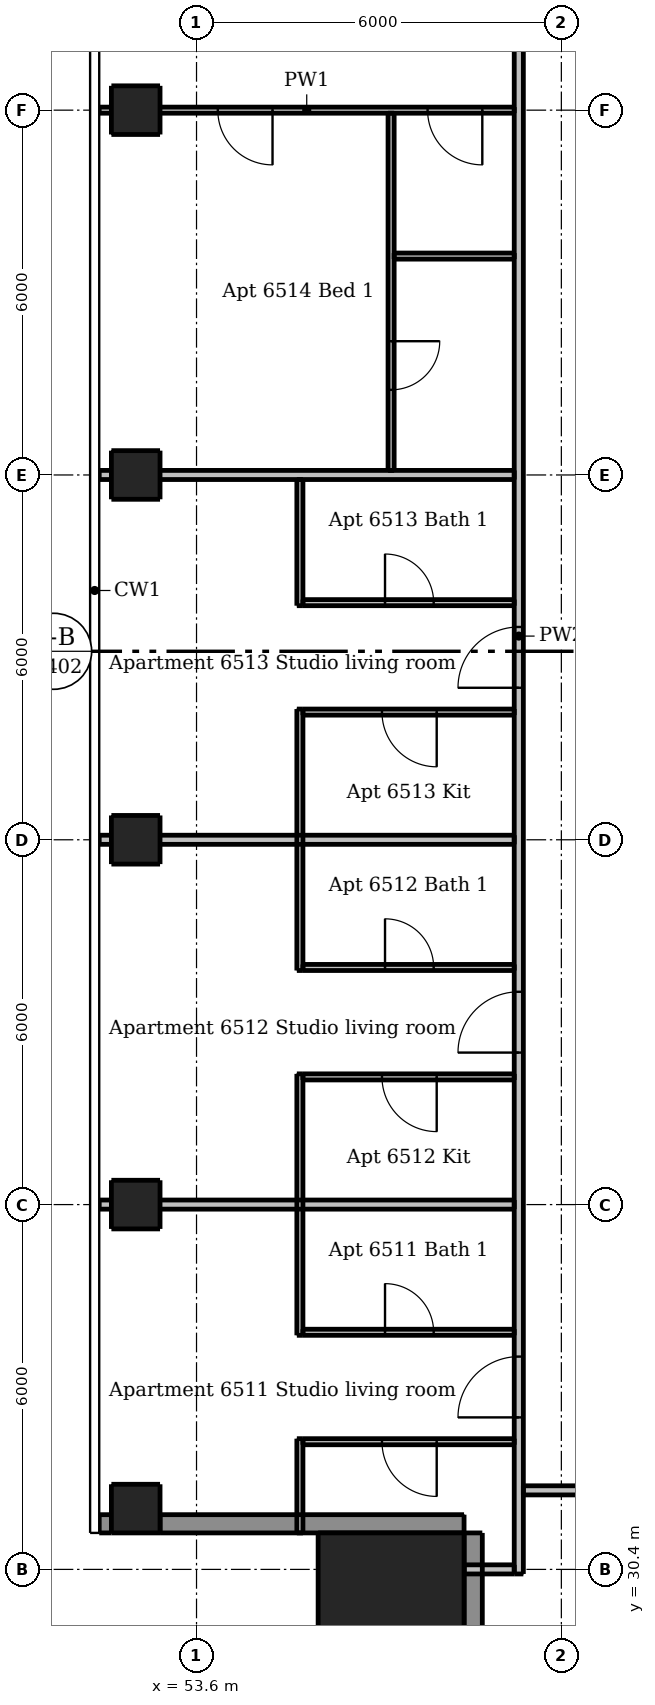
"""IFC4 building model, lengths in metres.
Left out: names, types, materials, properties, quantities, classifications, styles, units other than length and angle.
Written with IfcOpenShell. Run it as: python <this file> out.ifc"""

import sys

from ifc_helpers import new_model, si_unit, direction, frame, frame_2d, origin, origin_2d, place, context, subcontext, project, spatial, rectangle, extrude, element, fill, save


model = new_model("IFC4")
c1 = context("Model", 3, precision=1e-05, world=origin(), true_north=direction((0.0, 1.0)))
c2 = subcontext(c1, "Body", "Model", "MODEL_VIEW")
j1 = project(units=[si_unit("LENGTHUNIT", "METRE"), si_unit("PLANEANGLEUNIT", "RADIAN")], contexts=[c1])
p1 = place(None, origin())
s1 = spatial("IfcSite", under=j1, at=p1, CompositionType="ELEMENT")
p2 = place(p1, origin())
s2 = spatial("IfcBuilding", under=s1, at=p2, CompositionType="ELEMENT")
p3 = place(p2, frame((0.0, 0.0, 245.5)))
s3 = spatial("IfcBuildingStorey", under=s2, at=p3, CompositionType="ELEMENT", Elevation=245.5)
for number, where, z_axis, x_axis in (
    (1, (52.6, 31.4, 0.0), (0.0, 0.0, 1.0), (1.0, 0.0, 0.0)),
    (2, (52.6, 36.4, 0.0), (0.0, 0.0, 1.0), (1.0, 0.0, 0.0)),
    (3, (52.6, 42.4, 0.0), (0.0, 0.0, 1.0), (1.0, 0.0, 0.0)),
    (4, (52.6, 48.4, 0.0), (0.0, 0.0, 1.0), (1.0, 0.0, 0.0)),
    (5, (52.6, 54.4, 0.0), (0.0, 0.0, 1.0), (1.0, 0.0, 0.0)),
):
    element("IfcColumn", number, at=place(p3, frame(where, z_axis=z_axis, x_axis=x_axis)), inside=s3, PredefinedType="COLUMN", context=c2, shape_type="SweptSolid", body=[
        extrude(rectangle(XDim=0.8, YDim=0.8, at=origin_2d()), origin(), (0.0, 0.0, 1.0), 3.05),
    ])
p4 = place(p3, frame((56.8, 29.8, 0.0), z_axis=(0.0, 0.0, 1.0), x_axis=(1.0, 0.0, 0.0)))
e6 = element("IfcColumn", 6, at=p4, inside=s3, PredefinedType="COLUMN", context=c2, shape_type="SweptSolid", body=[
    extrude(rectangle(XDim=2.4, YDim=2.4, at=origin_2d()), origin(), (0.0, 0.0, 1.0), 3.3),
])
p5 = place(p3, frame((52.0, 31.15, 0.0), z_axis=(0.0, 0.0, 1.0), x_axis=(1.0, 0.0, 0.0)))
e7 = element("IfcWall", 7, at=p5, inside=s3, PredefinedType="SOLIDWALL", context=c2, shape_type="SweptSolid", body=[
    extrude(rectangle(XDim=0.2, YDim=0.3, at=frame_2d((0.1, 0.0))), origin(), (0.0, 0.0, 1.0), 3.05),
])
p6 = place(p3, frame((53.0, 31.15, 0.0), z_axis=(0.0, 0.0, 1.0), x_axis=(1.0, 0.0, 0.0)))
e8 = element("IfcWall", 8, at=p6, inside=s3, PredefinedType="SOLIDWALL", context=c2, shape_type="SweptSolid", body=[
    extrude(rectangle(XDim=5.0, YDim=0.3, at=frame_2d((2.5, 0.0))), origin(), (0.0, 0.0, 1.0), 3.05),
])
p7 = place(p3, frame((58.15, 31.0, 0.0), z_axis=(0.0, 0.0, 1.0), x_axis=(0.0, -1.0, 0.0)))
e9 = element("IfcWall", 9, at=p7, inside=s3, PredefinedType="SOLIDWALL", context=c2, shape_type="SweptSolid", body=[
    extrude(rectangle(XDim=6.0, YDim=0.3, at=frame_2d((3.0, 0.0))), origin(), (0.0, 0.0, 1.0), 3.05),
])
p8 = place(p7, frame((1.8, 0.0, 0.15)))
e10 = element("IfcOpeningElement", 10, at=p8, cuts=e9, PredefinedType="OPENING", context=c2, shape_type="SweptSolid", body=[
    extrude(rectangle(XDim=2.4, YDim=2.1, at=frame_2d((1.2, 1.05))), frame((0.0, 0.16, 0.0), z_axis=(0.0, -1.0, 0.0), x_axis=(1.0, 0.0, 0.0)), (0.0, 0.0, 1.0), 0.32),
])
p9 = place(p3, frame((55.3, 31.0, 0.0), z_axis=(0.0, 0.0, 1.0), x_axis=(0.0, 1.0, 0.0)))
e11 = element("IfcWall", 11, at=p9, inside=s3, PredefinedType="PARTITIONING", context=c2, shape_type="SweptSolid", body=[
    extrude(rectangle(XDim=1.55, YDim=0.1, at=frame_2d((0.775, 0.0))), origin(), (0.0, 0.0, 1.0), 3.05),
])
for number, where, z_axis, x_axis in (
    (12, (55.3, 34.25, 0.0), (0.0, 0.0, 1.0), (0.0, 1.0, 0.0)),
    (13, (55.3, 40.25, 0.0), (0.0, 0.0, 1.0), (0.0, 1.0, 0.0)),
):
    element("IfcWall", number, at=place(p3, frame(where, z_axis=z_axis, x_axis=x_axis)), inside=s3, PredefinedType="PARTITIONING", context=c2, shape_type="SweptSolid", body=[
        extrude(rectangle(XDim=4.3, YDim=0.1, at=frame_2d((2.15, 0.0))), origin(), (0.0, 0.0, 1.0), 3.05),
    ])
p10 = place(p3, frame((55.3, 46.25, 0.0), z_axis=(0.0, 0.0, 1.0), x_axis=(0.0, 1.0, 0.0)))
e14 = element("IfcWall", 14, at=p10, inside=s3, PredefinedType="PARTITIONING", context=c2, shape_type="SweptSolid", body=[
    extrude(rectangle(XDim=2.075, YDim=0.1, at=frame_2d((1.038, 0.0))), origin(), (0.0, 0.0, 1.0), 3.05),
])
p11 = place(p3, frame((56.8, 54.35, 0.0), z_axis=(0.0, 0.0, 1.0), x_axis=(0.0, -1.0, 0.0)))
e15 = element("IfcWall", 15, at=p11, inside=s3, PredefinedType="PARTITIONING", context=c2, shape_type="SweptSolid", body=[
    extrude(rectangle(XDim=5.875, YDim=0.1, at=frame_2d((2.938, 0.0))), origin(), (0.0, 0.0, 1.0), 3.05),
])
p12 = place(p11, frame((3.75, 0.0, 0.0)))
e16 = element("IfcOpeningElement", 16, at=p12, cuts=e15, PredefinedType="OPENING", context=c2, shape_type="SweptSolid", body=[
    extrude(rectangle(XDim=0.8, YDim=2.1, at=frame_2d((0.4, 1.05))), frame((0.0, 0.06, 0.0), z_axis=(0.0, -1.0, 0.0), x_axis=(1.0, 0.0, 0.0)), (0.0, 0.0, 1.0), 0.12),
])
p13 = place(p3, frame((58.825, 54.4, 0.0), z_axis=(0.0, 0.0, 1.0), x_axis=(-1.0, 0.0, 0.0)))
e17 = element("IfcWall", 17, at=p13, inside=s3, PredefinedType="PARTITIONING", context=c2, shape_type="SweptSolid", body=[
    extrude(rectangle(XDim=6.825, YDim=0.1, at=frame_2d((3.413, 0.0))), origin(), (0.0, 0.0, 1.0), 2.516),
])
p14 = place(p13, frame((0.525, 0.0, 0.0)))
e18 = element("IfcOpeningElement", 18, at=p14, cuts=e17, PredefinedType="OPENING", context=c2, shape_type="SweptSolid", body=[
    extrude(rectangle(XDim=0.9, YDim=2.1, at=frame_2d((0.45, 1.05))), frame((0.0, 0.06, 0.0), z_axis=(0.0, -1.0, 0.0), x_axis=(1.0, 0.0, 0.0)), (0.0, 0.0, 1.0), 0.12),
])
p15 = place(p13, frame((3.975, 0.0, 0.0)))
e19 = element("IfcOpeningElement", 19, at=p15, cuts=e17, PredefinedType="OPENING", context=c2, shape_type="SweptSolid", body=[
    extrude(rectangle(XDim=0.9, YDim=2.1, at=frame_2d((0.45, 1.05))), frame((0.0, 0.06, 0.0), z_axis=(0.0, -1.0, 0.0), x_axis=(1.0, 0.0, 0.0)), (0.0, 0.0, 1.0), 0.12),
])
p16 = place(p3, frame((56.85, 52.0, 0.0), z_axis=(0.0, 0.0, 1.0), x_axis=(1.0, 0.0, 0.0)))
e20 = element("IfcWall", 20, at=p16, inside=s3, PredefinedType="PARTITIONING", context=c2, shape_type="SweptSolid", body=[
    extrude(rectangle(XDim=1.975, YDim=0.1, at=frame_2d((0.987, 0.0))), origin(), (0.0, 0.0, 1.0), 3.05),
])
p17 = place(p3, frame((55.35, 46.3, 0.0), z_axis=(0.0, 0.0, 1.0), x_axis=(1.0, 0.0, 0.0)))
e21 = element("IfcWall", 21, at=p17, inside=s3, PredefinedType="PARTITIONING", context=c2, shape_type="SweptSolid", body=[
    extrude(rectangle(XDim=3.475, YDim=0.1, at=frame_2d((1.737, 0.0))), origin(), (0.0, 0.0, 1.0), 3.05),
])
p18 = place(p17, frame((1.35, 0.0, 0.0)))
e22 = element("IfcOpeningElement", 22, at=p18, cuts=e21, PredefinedType="OPENING", context=c2, shape_type="SweptSolid", body=[
    extrude(rectangle(XDim=0.8, YDim=2.1, at=frame_2d((0.4, 1.05))), frame((0.0, 0.06, 0.0), z_axis=(0.0, -1.0, 0.0), x_axis=(1.0, 0.0, 0.0)), (0.0, 0.0, 1.0), 0.12),
])
p19 = place(p3, frame((58.825, 44.5, 0.0), z_axis=(0.0, 0.0, 1.0), x_axis=(-1.0, 0.0, 0.0)))
e23 = element("IfcWall", 23, at=p19, inside=s3, PredefinedType="PARTITIONING", context=c2, shape_type="SweptSolid", body=[
    extrude(rectangle(XDim=3.475, YDim=0.1, at=frame_2d((1.737, 0.0))), origin(), (0.0, 0.0, 1.0), 3.05),
])
p20 = place(p19, frame((1.275, 0.0, 0.0)))
e24 = element("IfcOpeningElement", 24, at=p20, cuts=e23, PredefinedType="OPENING", context=c2, shape_type="SweptSolid", body=[
    extrude(rectangle(XDim=0.9, YDim=2.1, at=frame_2d((0.45, 1.05))), frame((0.0, 0.06, 0.0), z_axis=(0.0, -1.0, 0.0), x_axis=(1.0, 0.0, 0.0)), (0.0, 0.0, 1.0), 0.12),
])
p21 = place(p3, frame((55.35, 40.3, 0.0), z_axis=(0.0, 0.0, 1.0), x_axis=(1.0, 0.0, 0.0)))
e25 = element("IfcWall", 25, at=p21, inside=s3, PredefinedType="PARTITIONING", context=c2, shape_type="SweptSolid", body=[
    extrude(rectangle(XDim=3.475, YDim=0.1, at=frame_2d((1.737, 0.0))), origin(), (0.0, 0.0, 1.0), 3.05),
])
p22 = place(p21, frame((1.35, 0.0, 0.0)))
e26 = element("IfcOpeningElement", 26, at=p22, cuts=e25, PredefinedType="OPENING", context=c2, shape_type="SweptSolid", body=[
    extrude(rectangle(XDim=0.8, YDim=2.1, at=frame_2d((0.4, 1.05))), frame((0.0, 0.06, 0.0), z_axis=(0.0, -1.0, 0.0), x_axis=(1.0, 0.0, 0.0)), (0.0, 0.0, 1.0), 0.12),
])
p23 = place(p3, frame((58.825, 38.5, 0.0), z_axis=(0.0, 0.0, 1.0), x_axis=(-1.0, 0.0, 0.0)))
e27 = element("IfcWall", 27, at=p23, inside=s3, PredefinedType="PARTITIONING", context=c2, shape_type="SweptSolid", body=[
    extrude(rectangle(XDim=3.475, YDim=0.1, at=frame_2d((1.737, 0.0))), origin(), (0.0, 0.0, 1.0), 3.05),
])
p24 = place(p23, frame((1.275, 0.0, 0.0)))
e28 = element("IfcOpeningElement", 28, at=p24, cuts=e27, PredefinedType="OPENING", context=c2, shape_type="SweptSolid", body=[
    extrude(rectangle(XDim=0.9, YDim=2.1, at=frame_2d((0.45, 1.05))), frame((0.0, 0.06, 0.0), z_axis=(0.0, -1.0, 0.0), x_axis=(1.0, 0.0, 0.0)), (0.0, 0.0, 1.0), 0.12),
])
p25 = place(p3, frame((55.35, 34.3, 0.0), z_axis=(0.0, 0.0, 1.0), x_axis=(1.0, 0.0, 0.0)))
e29 = element("IfcWall", 29, at=p25, inside=s3, PredefinedType="PARTITIONING", context=c2, shape_type="SweptSolid", body=[
    extrude(rectangle(XDim=3.475, YDim=0.1, at=frame_2d((1.737, 0.0))), origin(), (0.0, 0.0, 1.0), 3.05),
])
p26 = place(p25, frame((1.35, 0.0, 0.0)))
e30 = element("IfcOpeningElement", 30, at=p26, cuts=e29, PredefinedType="OPENING", context=c2, shape_type="SweptSolid", body=[
    extrude(rectangle(XDim=0.8, YDim=2.1, at=frame_2d((0.4, 1.05))), frame((0.0, 0.06, 0.0), z_axis=(0.0, -1.0, 0.0), x_axis=(1.0, 0.0, 0.0)), (0.0, 0.0, 1.0), 0.12),
])
p27 = place(p3, frame((58.825, 32.5, 0.0), z_axis=(0.0, 0.0, 1.0), x_axis=(-1.0, 0.0, 0.0)))
e31 = element("IfcWall", 31, at=p27, inside=s3, PredefinedType="PARTITIONING", context=c2, shape_type="SweptSolid", body=[
    extrude(rectangle(XDim=3.475, YDim=0.1, at=frame_2d((1.737, 0.0))), origin(), (0.0, 0.0, 1.0), 3.05),
])
p28 = place(p27, frame((1.275, 0.0, 0.0)))
e32 = element("IfcOpeningElement", 32, at=p28, cuts=e31, PredefinedType="OPENING", context=c2, shape_type="SweptSolid", body=[
    extrude(rectangle(XDim=0.9, YDim=2.1, at=frame_2d((0.45, 1.05))), frame((0.0, 0.06, 0.0), z_axis=(0.0, -1.0, 0.0), x_axis=(1.0, 0.0, 0.0)), (0.0, 0.0, 1.0), 0.12),
])
p29 = place(p3, frame((58.9, 30.325, 0.0), z_axis=(0.0, 0.0, 1.0), x_axis=(0.0, 1.0, 0.0)))
e33 = element("IfcWall", 33, at=p29, inside=s3, PredefinedType="PARTITIONING", context=c2, shape_type="SweptSolid", body=[
    extrude(rectangle(XDim=30.85, YDim=0.15, at=frame_2d((15.425, 0.0))), origin(), (0.0, 0.0, 1.0), 3.05),
])
p30 = place(p29, frame((2.575, 0.0, 0.0)))
e34 = element("IfcOpeningElement", 34, at=p30, cuts=e33, PredefinedType="OPENING", context=c2, shape_type="SweptSolid", body=[
    extrude(rectangle(XDim=1.0, YDim=2.1, at=frame_2d((0.5, 1.05))), frame((0.0, 0.085, 0.0), z_axis=(0.0, -1.0, 0.0), x_axis=(1.0, 0.0, 0.0)), (0.0, 0.0, 1.0), 0.17),
])
p31 = place(p29, frame((8.575, 0.0, 0.0)))
e35 = element("IfcOpeningElement", 35, at=p31, cuts=e33, PredefinedType="OPENING", context=c2, shape_type="SweptSolid", body=[
    extrude(rectangle(XDim=1.0, YDim=2.1, at=frame_2d((0.5, 1.05))), frame((0.0, 0.085, 0.0), z_axis=(0.0, -1.0, 0.0), x_axis=(1.0, 0.0, 0.0)), (0.0, 0.0, 1.0), 0.17),
])
p32 = place(p29, frame((14.575, 0.0, 0.0)))
e36 = element("IfcOpeningElement", 36, at=p32, cuts=e33, PredefinedType="OPENING", context=c2, shape_type="SweptSolid", body=[
    extrude(rectangle(XDim=1.0, YDim=2.1, at=frame_2d((0.5, 1.05))), frame((0.0, 0.085, 0.0), z_axis=(0.0, -1.0, 0.0), x_axis=(1.0, 0.0, 0.0)), (0.0, 0.0, 1.0), 0.17),
])
p33 = place(p29, frame((26.925, 0.0, 0.0)))
e37 = element("IfcOpeningElement", 37, at=p33, cuts=e33, PredefinedType="OPENING", context=c2, shape_type="SweptSolid", body=[
    extrude(rectangle(XDim=1.0, YDim=2.1, at=frame_2d((0.5, 1.05))), frame((0.0, 0.085, 0.0), z_axis=(0.0, -1.0, 0.0), x_axis=(1.0, 0.0, 0.0)), (0.0, 0.0, 1.0), 0.17),
])
for number, where, z_axis, x_axis in (
    (38, (52.0, 48.4, 0.0), (0.0, 0.0, 1.0), (1.0, 0.0, 0.0)),
    (39, (52.0, 42.4, 0.0), (0.0, 0.0, 1.0), (1.0, 0.0, 0.0)),
    (40, (52.0, 36.4, 0.0), (0.0, 0.0, 1.0), (1.0, 0.0, 0.0)),
):
    element("IfcWall", number, at=place(p3, frame(where, z_axis=z_axis, x_axis=x_axis)), inside=s3, PredefinedType="PARTITIONING", context=c2, shape_type="SweptSolid", body=[
        extrude(rectangle(XDim=6.825, YDim=0.15, at=frame_2d((3.413, 0.0))), origin(), (0.0, 0.0, 1.0), 2.516),
    ])
p34 = place(p3, frame((89.525, 31.7, 0.0), z_axis=(0.0, 0.0, 1.0), x_axis=(-1.0, 0.0, 0.0)))
e41 = element("IfcWall", 41, at=p34, inside=s3, PredefinedType="PARTITIONING", context=c2, shape_type="SweptSolid", body=[
    extrude(rectangle(XDim=30.55, YDim=0.15, at=frame_2d((15.275, 0.0))), origin(), (0.0, 0.0, 1.0), 3.05),
])
p35 = place(p34, frame((26.775, 0.0, 0.0)))
e42 = element("IfcOpeningElement", 42, at=p35, cuts=e41, PredefinedType="OPENING", context=c2, shape_type="SweptSolid", body=[
    extrude(rectangle(XDim=1.0, YDim=2.1, at=frame_2d((0.5, 1.05))), frame((0.0, 0.085, 0.0), z_axis=(0.0, -1.0, 0.0), x_axis=(1.0, 0.0, 0.0)), (0.0, 0.0, 1.0), 0.17),
])
p36 = place(p34, frame((14.425, 0.0, 0.0)))
e43 = element("IfcOpeningElement", 43, at=p36, cuts=e41, PredefinedType="OPENING", context=c2, shape_type="SweptSolid", body=[
    extrude(rectangle(XDim=1.0, YDim=2.1, at=frame_2d((0.5, 1.05))), frame((0.0, 0.085, 0.0), z_axis=(0.0, -1.0, 0.0), x_axis=(1.0, 0.0, 0.0)), (0.0, 0.0, 1.0), 0.17),
])
p37 = place(p34, frame((6.962, 0.0, 0.0)))
e44 = element("IfcOpeningElement", 44, at=p37, cuts=e41, PredefinedType="OPENING", context=c2, shape_type="SweptSolid", body=[
    extrude(rectangle(XDim=1.0, YDim=2.1, at=frame_2d((0.5, 1.05))), frame((0.0, 0.085, 0.0), z_axis=(0.0, -1.0, 0.0), x_axis=(1.0, 0.0, 0.0)), (0.0, 0.0, 1.0), 0.17),
])
p38 = place(p3, frame((58.0, 30.4, 0.0), z_axis=(0.0, 0.0, 1.0), x_axis=(1.0, 0.0, 0.0)))
e45 = element("IfcWall", 45, at=p38, inside=s3, PredefinedType="PARTITIONING", context=c2, shape_type="SweptSolid", body=[
    extrude(rectangle(XDim=0.825, YDim=0.15, at=frame_2d((0.413, 0.0))), origin(), (0.0, 0.0, 1.0), 3.05),
])
p39 = place(p30, origin())
e46 = element("IfcDoor", 46, at=p39, inside=s3, OperationType="SINGLE_SWING_LEFT", PredefinedType="DOOR", context=c2, shape_type="SweptSolid", body=[
    extrude(rectangle(XDim=1.0, YDim=2.1, at=frame_2d((0.5, 1.05))), frame((0.0, 0.025, 0.0), z_axis=(0.0, -1.0, 0.0), x_axis=(1.0, 0.0, 0.0)), (0.0, 0.0, 1.0), 0.05),
])
fill(e34, e46)
p40 = place(p28, origin())
e47 = element("IfcDoor", 47, at=p40, inside=s3, OperationType="SINGLE_SWING_LEFT", PredefinedType="DOOR", context=c2, shape_type="SweptSolid", body=[
    extrude(rectangle(XDim=0.9, YDim=2.1, at=frame_2d((0.45, 1.05))), frame((0.0, 0.025, 0.0), z_axis=(0.0, -1.0, 0.0), x_axis=(1.0, 0.0, 0.0)), (0.0, 0.0, 1.0), 0.05),
])
fill(e32, e47)
p41 = place(p26, origin())
e48 = element("IfcDoor", 48, at=p41, inside=s3, OperationType="SINGLE_SWING_LEFT", PredefinedType="DOOR", context=c2, shape_type="SweptSolid", body=[
    extrude(rectangle(XDim=0.8, YDim=2.1, at=frame_2d((0.4, 1.05))), frame((0.0, 0.025, 0.0), z_axis=(0.0, -1.0, 0.0), x_axis=(1.0, 0.0, 0.0)), (0.0, 0.0, 1.0), 0.05),
])
fill(e30, e48)
p42 = place(p31, origin())
e49 = element("IfcDoor", 49, at=p42, inside=s3, OperationType="SINGLE_SWING_LEFT", PredefinedType="DOOR", context=c2, shape_type="SweptSolid", body=[
    extrude(rectangle(XDim=1.0, YDim=2.1, at=frame_2d((0.5, 1.05))), frame((0.0, 0.025, 0.0), z_axis=(0.0, -1.0, 0.0), x_axis=(1.0, 0.0, 0.0)), (0.0, 0.0, 1.0), 0.05),
])
fill(e35, e49)
p43 = place(p24, origin())
e50 = element("IfcDoor", 50, at=p43, inside=s3, OperationType="SINGLE_SWING_LEFT", PredefinedType="DOOR", context=c2, shape_type="SweptSolid", body=[
    extrude(rectangle(XDim=0.9, YDim=2.1, at=frame_2d((0.45, 1.05))), frame((0.0, 0.025, 0.0), z_axis=(0.0, -1.0, 0.0), x_axis=(1.0, 0.0, 0.0)), (0.0, 0.0, 1.0), 0.05),
])
fill(e28, e50)
p44 = place(p22, origin())
e51 = element("IfcDoor", 51, at=p44, inside=s3, OperationType="SINGLE_SWING_LEFT", PredefinedType="DOOR", context=c2, shape_type="SweptSolid", body=[
    extrude(rectangle(XDim=0.8, YDim=2.1, at=frame_2d((0.4, 1.05))), frame((0.0, 0.025, 0.0), z_axis=(0.0, -1.0, 0.0), x_axis=(1.0, 0.0, 0.0)), (0.0, 0.0, 1.0), 0.05),
])
fill(e26, e51)
p45 = place(p32, origin())
e52 = element("IfcDoor", 52, at=p45, inside=s3, OperationType="SINGLE_SWING_LEFT", PredefinedType="DOOR", context=c2, shape_type="SweptSolid", body=[
    extrude(rectangle(XDim=1.0, YDim=2.1, at=frame_2d((0.5, 1.05))), frame((0.0, 0.025, 0.0), z_axis=(0.0, -1.0, 0.0), x_axis=(1.0, 0.0, 0.0)), (0.0, 0.0, 1.0), 0.05),
])
fill(e36, e52)
p46 = place(p20, origin())
e53 = element("IfcDoor", 53, at=p46, inside=s3, OperationType="SINGLE_SWING_LEFT", PredefinedType="DOOR", context=c2, shape_type="SweptSolid", body=[
    extrude(rectangle(XDim=0.9, YDim=2.1, at=frame_2d((0.45, 1.05))), frame((0.0, 0.025, 0.0), z_axis=(0.0, -1.0, 0.0), x_axis=(1.0, 0.0, 0.0)), (0.0, 0.0, 1.0), 0.05),
])
fill(e24, e53)
p47 = place(p18, origin())
e54 = element("IfcDoor", 54, at=p47, inside=s3, OperationType="SINGLE_SWING_LEFT", PredefinedType="DOOR", context=c2, shape_type="SweptSolid", body=[
    extrude(rectangle(XDim=0.8, YDim=2.1, at=frame_2d((0.4, 1.05))), frame((0.0, 0.025, 0.0), z_axis=(0.0, -1.0, 0.0), x_axis=(1.0, 0.0, 0.0)), (0.0, 0.0, 1.0), 0.05),
])
fill(e22, e54)
p48 = place(p14, origin())
e55 = element("IfcDoor", 55, at=p48, inside=s3, OperationType="SINGLE_SWING_LEFT", PredefinedType="DOOR", context=c2, shape_type="SweptSolid", body=[
    extrude(rectangle(XDim=0.9, YDim=2.1, at=frame_2d((0.45, 1.05))), frame((0.0, 0.025, 0.0), z_axis=(0.0, -1.0, 0.0), x_axis=(1.0, 0.0, 0.0)), (0.0, 0.0, 1.0), 0.05),
])
fill(e18, e55)
p49 = place(p15, origin())
e56 = element("IfcDoor", 56, at=p49, inside=s3, OperationType="SINGLE_SWING_LEFT", PredefinedType="DOOR", context=c2, shape_type="SweptSolid", body=[
    extrude(rectangle(XDim=0.9, YDim=2.1, at=frame_2d((0.45, 1.05))), frame((0.0, 0.025, 0.0), z_axis=(0.0, -1.0, 0.0), x_axis=(1.0, 0.0, 0.0)), (0.0, 0.0, 1.0), 0.05),
])
fill(e19, e56)
p50 = place(p12, origin())
e57 = element("IfcDoor", 57, at=p50, inside=s3, OperationType="SINGLE_SWING_LEFT", PredefinedType="DOOR", context=c2, shape_type="SweptSolid", body=[
    extrude(rectangle(XDim=0.8, YDim=2.1, at=frame_2d((0.4, 1.05))), frame((0.0, 0.025, 0.0), z_axis=(0.0, -1.0, 0.0), x_axis=(1.0, 0.0, 0.0)), (0.0, 0.0, 1.0), 0.05),
])
fill(e16, e57)
save(model, sys.argv[1])
